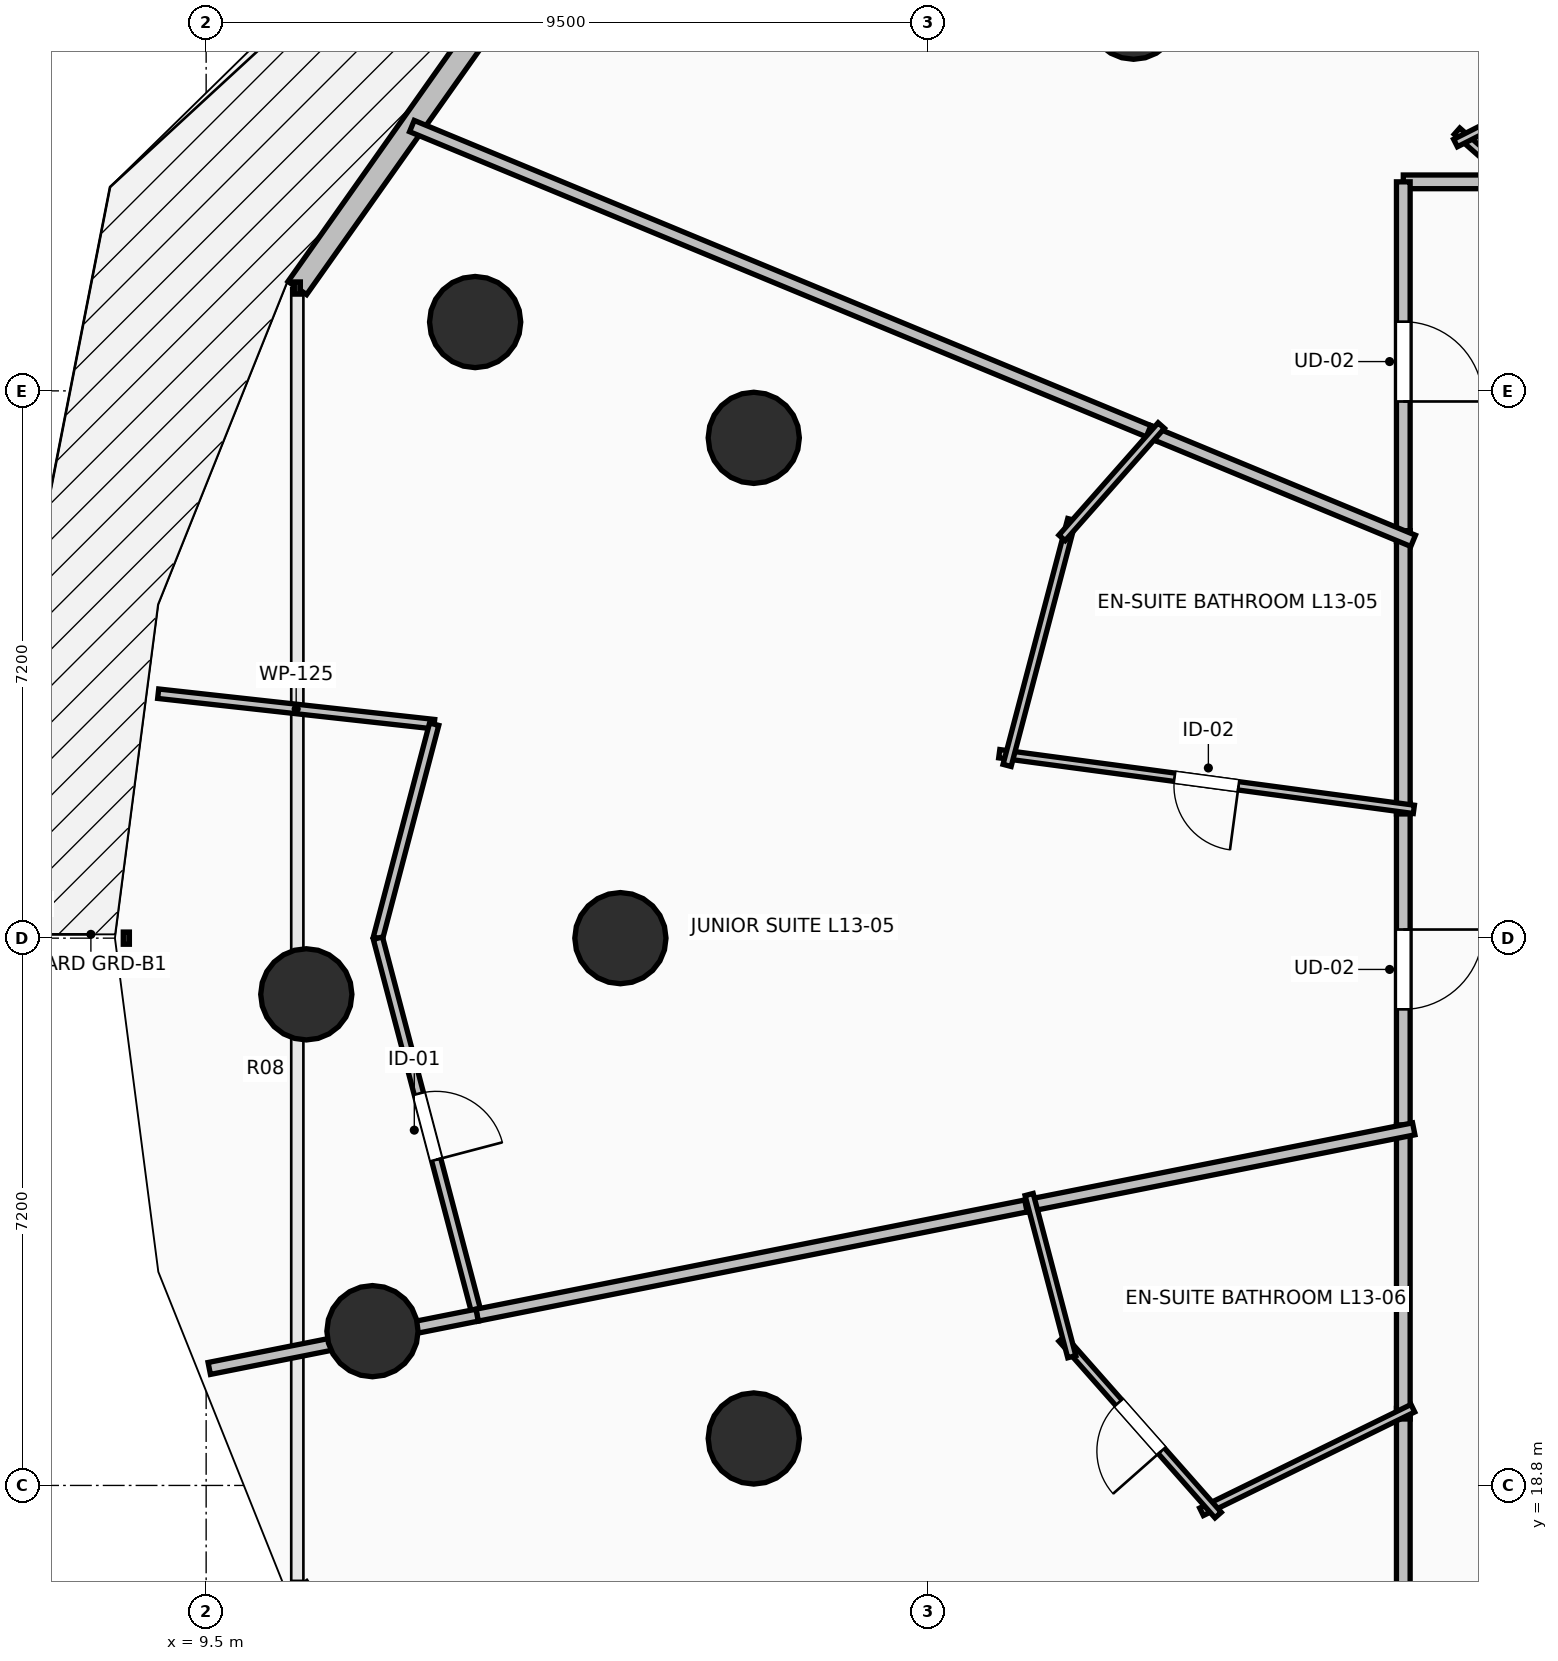
"""IFC4 building model, lengths in metres.
Left out: names, types, materials, properties, quantities, classifications, styles, units other than length and angle.
Written with IfcOpenShell. Run it as: python <this file> out.ifc"""

import sys

from ifc_helpers import new_model, si_unit, direction, frame, frame_2d, origin, origin_2d, place, context, subcontext, project, spatial, rectangle, circle, extrude, element, fill, save


model = new_model("IFC4")
c1 = context("Model", 3, precision=1e-05, world=origin(), true_north=direction((0.0, 1.0)))
c2 = subcontext(c1, "Body", "Model", "MODEL_VIEW")
j1 = project(units=[si_unit("LENGTHUNIT", "METRE"), si_unit("PLANEANGLEUNIT", "RADIAN")], contexts=[c1])
p1 = place(None, origin())
s1 = spatial("IfcSite", under=j1, at=p1, CompositionType="ELEMENT")
p2 = place(p1, origin())
s2 = spatial("IfcBuilding", under=s1, at=p2, CompositionType="ELEMENT")
p3 = place(p2, frame((0.0, 0.0, 52.0)))
s3 = spatial("IfcBuildingStorey", under=s2, at=p3, CompositionType="ELEMENT", Elevation=52.0)
for number, where, z_axis, x_axis in (
    (1, (21.701, 38.162, 0.0), (0.0, 0.0, 1.0), (-0.707, 0.707, 0.0)),
    (2, (16.705, 32.582, 0.0), (0.0, 0.0, 1.0), (-0.924, 0.383, 0.0)),
    (3, (14.95, 26.0, 0.0), (0.0, 0.0, 1.0), (-1.0, 0.0, 0.0)),
    (4, (16.705, 19.418, 0.0), (0.0, 0.0, 1.0), (-0.924, -0.383, 0.0)),
    (5, (13.039, 34.105, 0.0), (0.0, 0.0, 1.0), (-0.924, 0.383, 0.0)),
    (6, (10.818, 25.261, 0.0), (0.0, 0.0, 1.0), (-1.0, 0.0, 0.0)),
    (7, (11.688, 20.83, 0.0), (0.0, 0.0, 1.0), (-0.924, -0.383, 0.0)),
):
    element("IfcColumn", number, at=place(p3, frame(where, z_axis=z_axis, x_axis=x_axis)), inside=s3, PredefinedType="COLUMN", context=c2, shape_type="SweptSolid", body=[
        extrude(circle(Radius=0.6, at=origin_2d()), origin(), (0.0, 0.0, 1.0), 3.5),
    ])
p4 = place(p3, frame((13.43, 38.417, 0.0), z_axis=(0.0, 0.0, 1.0), x_axis=(-0.577130815624, -0.816651713803, 0.0)))
e8 = element("IfcWall", 8, at=p4, inside=s3, PredefinedType="STANDARD", context=c2, shape_type="SweptSolid", body=[
    extrude(rectangle(XDim=4.731, YDim=0.3, at=frame_2d((2.366, 0.0))), origin(), (0.0, 0.0, 1.0), 3.24),
])
p5 = place(p3, frame((26.774, 35.95, 0.0), z_axis=(0.0, 0.0, 1.0), x_axis=(-1.0, 0.0, 0.0)))
e9 = element("IfcWall", 9, at=p5, inside=s3, PredefinedType="PARTITIONING", context=c2, shape_type="SweptSolid", body=[
    extrude(rectangle(XDim=1.524, YDim=0.18, at=frame_2d((0.762, 0.0))), origin(), (0.0, 0.0, 1.0), 2.886),
])
p6 = place(p3, frame((25.25, 35.95, 0.0), z_axis=(0.0, 0.0, 1.0), x_axis=(0.0, -1.0, 0.0)))
e10 = element("IfcWall", 10, at=p6, inside=s3, PredefinedType="PARTITIONING", context=c2, shape_type="SweptSolid", body=[
    extrude(rectangle(XDim=4.729, YDim=0.18, at=frame_2d((2.365, 0.0))), origin(), (0.0, 0.0, 1.0), 2.432),
])
p7 = place(p6, frame((1.84, 0.0, 0.0)))
e11 = element("IfcOpeningElement", 11, at=p7, cuts=e10, PredefinedType="OPENING", context=c2, shape_type="SweptSolid", body=[
    extrude(rectangle(XDim=1.05, YDim=2.2, at=frame_2d((0.525, 1.1))), frame((0.0, 0.105, 0.0), z_axis=(0.0, -1.0, 0.0), x_axis=(1.0, 0.0, 0.0)), (0.0, 0.0, 1.0), 0.21),
])
p8 = place(p3, frame((25.25, 27.774, 0.0), z_axis=(0.0, 0.0, 1.0), x_axis=(0.0, -1.0, 0.0)))
e12 = element("IfcWall", 12, at=p8, inside=s3, PredefinedType="PARTITIONING", context=c2, shape_type="SweptSolid", body=[
    extrude(rectangle(XDim=4.371, YDim=0.18, at=frame_2d((2.186, 0.0))), origin(), (0.0, 0.0, 1.0), 2.432),
])
p9 = place(p8, frame((1.66, 0.0, 0.0)))
e13 = element("IfcOpeningElement", 13, at=p9, cuts=e12, PredefinedType="OPENING", context=c2, shape_type="SweptSolid", body=[
    extrude(rectangle(XDim=1.05, YDim=2.2, at=frame_2d((0.525, 1.1))), frame((0.0, 0.105, 0.0), z_axis=(0.0, -1.0, 0.0), x_axis=(1.0, 0.0, 0.0)), (0.0, 0.0, 1.0), 0.21),
])
p10 = place(p3, frame((25.25, 31.361, 0.0), z_axis=(0.0, 0.0, 1.0), x_axis=(0.0, -1.0, 0.0)))
e14 = element("IfcWall", 14, at=p10, inside=s3, PredefinedType="PARTITIONING", context=c2, shape_type="SweptSolid", body=[
    extrude(rectangle(XDim=3.727, YDim=0.18, at=frame_2d((1.864, 0.0))), origin(), (0.0, 0.0, 1.0), 2.432),
])
p11 = place(p3, frame((25.25, 19.814, 0.0), z_axis=(0.0, 0.0, 1.0), x_axis=(0.0, -1.0, 0.0)))
e15 = element("IfcWall", 15, at=p11, inside=s3, PredefinedType="PARTITIONING", context=c2, shape_type="SweptSolid", body=[
    extrude(rectangle(XDim=5.714, YDim=0.18, at=frame_2d((2.857, 0.0))), origin(), (0.0, 0.0, 1.0), 2.432),
])
p12 = place(p11, frame((2.332, 0.0, 0.0)))
e16 = element("IfcOpeningElement", 16, at=p12, cuts=e15, PredefinedType="OPENING", context=c2, shape_type="SweptSolid", body=[
    extrude(rectangle(XDim=1.05, YDim=2.2, at=frame_2d((0.525, 1.1))), frame((0.0, 0.105, 0.0), z_axis=(0.0, -1.0, 0.0), x_axis=(1.0, 0.0, 0.0)), (0.0, 0.0, 1.0), 0.21),
])
p13 = place(p3, frame((25.25, 23.543, 0.0), z_axis=(0.0, 0.0, 1.0), x_axis=(0.0, -1.0, 0.0)))
e17 = element("IfcWall", 17, at=p13, inside=s3, PredefinedType="PARTITIONING", context=c2, shape_type="SweptSolid", body=[
    extrude(rectangle(XDim=3.869, YDim=0.18, at=frame_2d((1.935, 0.0))), origin(), (0.0, 0.0, 1.0), 3.24),
])
p14 = place(p3, frame((26.819, 35.857, 0.0), z_axis=(0.0, 0.0, 1.0), x_axis=(-0.750624975639, 0.660728496394, 0.0)))
e18 = element("IfcWall", 18, at=p14, inside=s3, PredefinedType="PARTITIONING", context=c2, shape_type="SweptSolid", body=[
    extrude(rectangle(XDim=1.149, YDim=0.11, at=frame_2d((0.574, 0.0))), origin(), (0.0, 0.0, 1.0), 2.886),
])
p15 = place(p3, frame((25.937, 36.461, 0.0), z_axis=(0.0, 0.0, 1.0), x_axis=(0.892461080662, 0.451124394711, 0.0)))
e19 = element("IfcWall", 19, at=p15, inside=s3, PredefinedType="PARTITIONING", context=c2, shape_type="SweptSolid", body=[
    extrude(rectangle(XDim=4.39, YDim=0.11, at=frame_2d((2.195, 0.0))), origin(), (0.0, 0.0, 1.0), 2.432),
])
p16 = place(p15, frame((1.77, 0.0, 0.0)))
e20 = element("IfcOpeningElement", 20, at=p16, cuts=e19, PredefinedType="OPENING", context=c2, shape_type="SweptSolid", body=[
    extrude(rectangle(XDim=0.85, YDim=2.1, at=frame_2d((0.425, 1.05))), frame((0.0, 0.07, 0.0), z_axis=(0.0, -1.0, 0.0), x_axis=(1.0, 0.0, 0.0)), (0.0, 0.0, 1.0), 0.14),
])
p17 = place(p3, frame((12.207, 36.684, 0.0), z_axis=(0.0, 0.0, 1.0), x_axis=(0.923876032578, -0.382691881842, 0.0)))
e21 = element("IfcWall", 21, at=p17, inside=s3, PredefinedType="PARTITIONING", context=c2, shape_type="SweptSolid", body=[
    extrude(rectangle(XDim=10.63, YDim=0.16, at=frame_2d((5.315, 0.0))), origin(), (0.0, 0.0, 1.0), 2.624),
])
p18 = place(p3, frame((21.899, 32.669, 0.0), z_axis=(0.0, 0.0, 1.0), x_axis=(0.923843852071, -0.382769561211, 0.0)))
e22 = element("IfcWall", 22, at=p18, inside=s3, PredefinedType="PARTITIONING", context=c2, shape_type="SweptSolid", body=[
    extrude(rectangle(XDim=3.768, YDim=0.16, at=frame_2d((1.884, 0.0))), origin(), (0.0, 0.0, 1.0), 2.886),
])
p19 = place(p3, frame((25.389, 27.694, 0.0), z_axis=(0.0, 0.0, 1.0), x_axis=(-0.991111683087, 0.133032445848, 0.0)))
e23 = element("IfcWall", 23, at=p19, inside=s3, PredefinedType="PARTITIONING", context=c2, shape_type="SweptSolid", body=[
    extrude(rectangle(XDim=5.504, YDim=0.11, at=frame_2d((2.752, 0.0))), origin(), (0.0, 0.0, 1.0), 2.432),
])
p20 = place(p19, frame((2.327, 0.0, 0.0)))
e24 = element("IfcOpeningElement", 24, at=p20, cuts=e23, PredefinedType="OPENING", context=c2, shape_type="SweptSolid", body=[
    extrude(rectangle(XDim=0.85, YDim=2.1, at=frame_2d((0.425, 1.05))), frame((0.0, 0.07, 0.0), z_axis=(0.0, -1.0, 0.0), x_axis=(1.0, 0.0, 0.0)), (0.0, 0.0, 1.0), 0.14),
])
p21 = place(p3, frame((20.037, 28.273, 0.0), z_axis=(0.0, 0.0, 1.0), x_axis=(0.254593926267, 0.967048050878, 0.0)))
e25 = element("IfcWall", 25, at=p21, inside=s3, PredefinedType="PARTITIONING", context=c2, shape_type="SweptSolid", body=[
    extrude(rectangle(XDim=3.344, YDim=0.11, at=frame_2d((1.672, 0.0))), origin(), (0.0, 0.0, 1.0), 2.432),
])
p22 = place(p3, frame((20.76, 31.266, 0.0), z_axis=(0.0, 0.0, 1.0), x_axis=(0.662047420969, 0.749461948593, 0.0)))
e26 = element("IfcWall", 26, at=p22, inside=s3, PredefinedType="PARTITIONING", context=c2, shape_type="SweptSolid", body=[
    extrude(rectangle(XDim=1.972, YDim=0.11, at=frame_2d((0.986, 0.0))), origin(), (0.0, 0.0, 1.0), 3.24),
])
p23 = place(p3, frame((8.869, 29.216, 0.0), z_axis=(0.0, 0.0, 1.0), x_axis=(0.99395362386, -0.109800699523, 0.0)))
e27 = element("IfcWall", 27, at=p23, inside=s3, PredefinedType="PARTITIONING", context=c2, shape_type="SweptSolid", body=[
    extrude(rectangle(XDim=3.653, YDim=0.125, at=frame_2d((1.827, 0.0))), origin(), (0.0, 0.0, 1.0), 2.624),
])
p24 = place(p3, frame((12.5, 28.815, 0.0), z_axis=(0.0, 0.0, 1.0), x_axis=(-0.254241432202, -0.967140783005, 0.0)))
e28 = element("IfcWall", 28, at=p24, inside=s3, PredefinedType="PARTITIONING", context=c2, shape_type="SweptSolid", body=[
    extrude(rectangle(XDim=2.911, YDim=0.125, at=frame_2d((1.455, 0.0))), origin(), (0.0, 0.0, 1.0), 3.24),
])
p25 = place(p3, frame((11.76, 26.0, 0.0), z_axis=(0.0, 0.0, 1.0), x_axis=(0.254434720755, -0.967089950767, 0.0)))
e29 = element("IfcWall", 29, at=p25, inside=s3, PredefinedType="PARTITIONING", context=c2, shape_type="SweptSolid", body=[
    extrude(rectangle(XDim=5.129, YDim=0.125, at=frame_2d((2.564, 0.0))), origin(), (0.0, 0.0, 1.0), 2.432),
])
p26 = place(p25, frame((2.115, 0.0, 0.0)))
e30 = element("IfcOpeningElement", 30, at=p26, cuts=e29, PredefinedType="OPENING", context=c2, shape_type="SweptSolid", body=[
    extrude(rectangle(XDim=0.9, YDim=2.1, at=frame_2d((0.45, 1.05))), frame((0.0, 0.077, 0.0), z_axis=(0.0, -1.0, 0.0), x_axis=(1.0, 0.0, 0.0)), (0.0, 0.0, 1.0), 0.155),
])
p27 = place(p3, frame((13.065, 21.04, 0.0), z_axis=(0.0, 0.0, 1.0), x_axis=(0.980774220135, 0.195145917502, 0.0)))
e31 = element("IfcWall", 31, at=p27, inside=s3, PredefinedType="PARTITIONING", context=c2, shape_type="SweptSolid", body=[
    extrude(rectangle(XDim=7.501, YDim=0.16, at=frame_2d((3.751, 0.0))), origin(), (0.0, 0.0, 1.0), 2.972),
])
p28 = place(p3, frame((20.285, 22.476, 0.0), z_axis=(0.0, 0.0, 1.0), x_axis=(0.980785905074, 0.195087181559, 0.0)))
e32 = element("IfcWall", 32, at=p28, inside=s3, PredefinedType="PARTITIONING", context=c2, shape_type="SweptSolid", body=[
    extrude(rectangle(XDim=5.202, YDim=0.16, at=frame_2d((2.601, 0.0))), origin(), (0.0, 0.0, 1.0), 2.886),
])
p29 = place(p3, frame((9.541, 20.339, 0.0), z_axis=(0.0, 0.0, 1.0), x_axis=(0.980786594985, 0.195083713053, 0.0)))
e33 = element("IfcWall", 33, at=p29, inside=s3, PredefinedType="PARTITIONING", context=c2, shape_type="SweptSolid", body=[
    extrude(rectangle(XDim=3.593, YDim=0.16, at=frame_2d((1.796, 0.0))), origin(), (0.0, 0.0, 1.0), 2.432),
])
p30 = place(p3, frame((25.376, 19.816, 0.0), z_axis=(0.0, 0.0, 1.0), x_axis=(-0.89800930559, -0.439976461954, 0.0)))
e34 = element("IfcWall", 34, at=p30, inside=s3, PredefinedType="PARTITIONING", context=c2, shape_type="SweptSolid", body=[
    extrude(rectangle(XDim=3.096, YDim=0.11, at=frame_2d((1.548, 0.0))), origin(), (0.0, 0.0, 1.0), 3.24),
])
p31 = place(p3, frame((22.814, 18.41, 0.0), z_axis=(0.0, 0.0, 1.0), x_axis=(-0.662186487972, 0.749339078887, 0.0)))
e35 = element("IfcWall", 35, at=p31, inside=s3, PredefinedType="PARTITIONING", context=c2, shape_type="SweptSolid", body=[
    extrude(rectangle(XDim=3.101, YDim=0.11, at=frame_2d((1.551, 0.0))), origin(), (0.0, 0.0, 1.0), 2.886),
])
p32 = place(p31, frame((1.125, 0.0, 0.0)))
e36 = element("IfcOpeningElement", 36, at=p32, cuts=e35, PredefinedType="OPENING", context=c2, shape_type="SweptSolid", body=[
    extrude(rectangle(XDim=0.85, YDim=2.1, at=frame_2d((0.425, 1.05))), frame((0.0, 0.07, 0.0), z_axis=(0.0, -1.0, 0.0), x_axis=(1.0, 0.0, 0.0)), (0.0, 0.0, 1.0), 0.14),
])
p33 = place(p3, frame((20.889, 20.494, 0.0), z_axis=(0.0, 0.0, 1.0), x_axis=(-0.254389812051, 0.967101764823, 0.0)))
e37 = element("IfcWall", 37, at=p33, inside=s3, PredefinedType="PARTITIONING", context=c2, shape_type="SweptSolid", body=[
    extrude(rectangle(XDim=2.206, YDim=0.11, at=frame_2d((1.103, 0.0))), origin(), (0.0, 0.0, 1.0), 3.24),
])
p34 = place(p7, origin())
e38 = element("IfcDoor", 38, at=p34, inside=s3, OperationType="SINGLE_SWING_RIGHT", PredefinedType="DOOR", context=c2, shape_type="SweptSolid", body=[
    extrude(rectangle(XDim=1.05, YDim=2.2, at=frame_2d((0.525, 1.1))), frame((0.0, 0.025, 0.0), z_axis=(0.0, -1.0, 0.0), x_axis=(1.0, 0.0, 0.0)), (0.0, 0.0, 1.0), 0.05),
])
fill(e11, e38)
p35 = place(p9, origin())
e39 = element("IfcDoor", 39, at=p35, inside=s3, OperationType="SINGLE_SWING_LEFT", PredefinedType="DOOR", context=c2, shape_type="SweptSolid", body=[
    extrude(rectangle(XDim=1.05, YDim=2.2, at=frame_2d((0.525, 1.1))), frame((0.0, 0.025, 0.0), z_axis=(0.0, -1.0, 0.0), x_axis=(1.0, 0.0, 0.0)), (0.0, 0.0, 1.0), 0.05),
])
fill(e13, e39)
p36 = place(p20, origin())
e40 = element("IfcDoor", 40, at=p36, inside=s3, OperationType="SINGLE_SWING_LEFT", PredefinedType="DOOR", context=c2, shape_type="SweptSolid", body=[
    extrude(rectangle(XDim=0.85, YDim=2.1, at=frame_2d((0.425, 1.05))), frame((0.0, 0.025, 0.0), z_axis=(0.0, -1.0, 0.0), x_axis=(1.0, 0.0, 0.0)), (0.0, 0.0, 1.0), 0.05),
])
fill(e24, e40)
p37 = place(p26, origin())
e41 = element("IfcDoor", 41, at=p37, inside=s3, OperationType="SINGLE_SWING_RIGHT", PredefinedType="DOOR", context=c2, shape_type="SweptSolid", body=[
    extrude(rectangle(XDim=0.9, YDim=2.1, at=frame_2d((0.45, 1.05))), frame((0.0, 0.025, 0.0), z_axis=(0.0, -1.0, 0.0), x_axis=(1.0, 0.0, 0.0)), (0.0, 0.0, 1.0), 0.05),
])
fill(e30, e41)
p38 = place(p32, origin())
e42 = element("IfcDoor", 42, at=p38, inside=s3, OperationType="SINGLE_SWING_LEFT", PredefinedType="DOOR", context=c2, shape_type="SweptSolid", body=[
    extrude(rectangle(XDim=0.85, YDim=2.1, at=frame_2d((0.425, 1.05))), frame((0.0, 0.025, 0.0), z_axis=(0.0, -1.0, 0.0), x_axis=(1.0, 0.0, 0.0)), (0.0, 0.0, 1.0), 0.05),
])
fill(e36, e42)
save(model, sys.argv[1])
